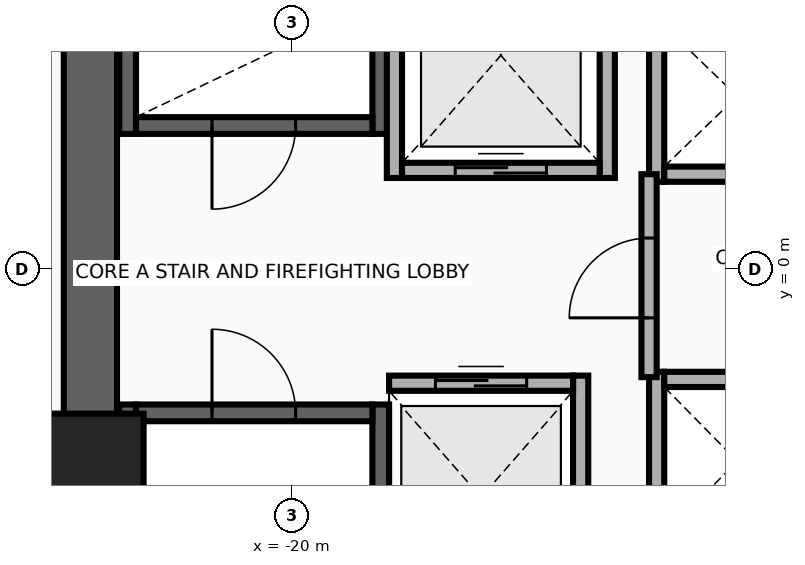
"""IFC4 building model, lengths in metres.
Left out: names, types, materials, properties, quantities, classifications, styles, units other than length and angle.
Written with IfcOpenShell. Run it as: python <this file> out.ifc"""

import sys

from ifc_helpers import new_model, si_unit, direction, frame, frame_2d, origin, origin_2d, place, context, subcontext, project, spatial, rectangle, extrude, source, transform, mapped, element, fill, save


model = new_model("IFC4")
c1 = context("Model", 3, precision=1e-05, world=origin(), true_north=direction((0.0, 1.0)))
c2 = subcontext(c1, "Body", "Model", "MODEL_VIEW")
j1 = project(units=[si_unit("LENGTHUNIT", "METRE"), si_unit("PLANEANGLEUNIT", "RADIAN")], contexts=[c1])
p1 = place(None, origin())
s1 = spatial("IfcSite", under=j1, at=p1, CompositionType="ELEMENT")
p2 = place(p1, origin())
s2 = spatial("IfcBuilding", under=s1, at=p2, CompositionType="ELEMENT")
p3 = place(p2, frame((0.0, 0.0, 48.2)))
s3 = spatial("IfcBuildingStorey", under=s2, at=p3, CompositionType="ELEMENT", Elevation=48.2)
for number, where, z_axis, x_axis in (
    (1, (-22.16, 1.78, 0.0), (0.0, 0.0, 1.0), (0.0, 1.0, 0.0)),
    (2, (-18.83, 1.78, 0.0), (0.0, 0.0, 1.0), (0.0, 1.0, 0.0)),
):
    element("IfcWall", number, at=place(p3, frame(where, z_axis=z_axis, x_axis=x_axis)), inside=s3, PredefinedType="SHEAR", context=c2, shape_type="SweptSolid", body=[
        extrude(rectangle(XDim=8.67, YDim=0.22, at=frame_2d((4.335, 0.0))), origin(), (0.0, 0.0, 1.0), 3.46),
    ])
p4 = place(p3, frame((-22.05, 1.89, 0.0), z_axis=(0.0, 0.0, 1.0), x_axis=(1.0, 0.0, 0.0)))
e3 = element("IfcWall", 3, at=p4, inside=s3, PredefinedType="SHEAR", context=c2, shape_type="SweptSolid", body=[
    extrude(rectangle(XDim=3.11, YDim=0.22, at=frame_2d((1.555, 0.0))), origin(), (0.0, 0.0, 1.0), 3.46),
])
p5 = place(p4, frame((1.0, 0.0, 0.0)))
e4 = element("IfcOpeningElement", 4, at=p5, cuts=e3, PredefinedType="OPENING", context=c2, shape_type="SweptSolid", body=[
    extrude(rectangle(XDim=1.1, YDim=2.15, at=frame_2d((0.55, 1.075))), frame((0.0, 0.125, 0.0), z_axis=(0.0, -1.0, 0.0), x_axis=(1.0, 0.0, 0.0)), (0.0, 0.0, 1.0), 0.25),
])
for number, where, z_axis, x_axis in (
    (5, (-22.16, -10.45, 0.0), (0.0, 0.0, 1.0), (0.0, 1.0, 0.0)),
    (6, (-18.83, -10.45, 0.0), (0.0, 0.0, 1.0), (0.0, 1.0, 0.0)),
):
    element("IfcWall", number, at=place(p3, frame(where, z_axis=z_axis, x_axis=x_axis)), inside=s3, PredefinedType="SHEAR", context=c2, shape_type="SweptSolid", body=[
        extrude(rectangle(XDim=8.67, YDim=0.22, at=frame_2d((4.335, 0.0))), origin(), (0.0, 0.0, 1.0), 3.46),
    ])
p6 = place(p3, frame((-22.05, -1.89, 0.0), z_axis=(0.0, 0.0, 1.0), x_axis=(1.0, 0.0, 0.0)))
e7 = element("IfcWall", 7, at=p6, inside=s3, PredefinedType="SHEAR", context=c2, shape_type="SweptSolid", body=[
    extrude(rectangle(XDim=3.11, YDim=0.22, at=frame_2d((1.555, 0.0))), origin(), (0.0, 0.0, 1.0), 3.46),
])
p7 = place(p6, frame((1.0, 0.0, 0.0)))
e8 = element("IfcOpeningElement", 8, at=p7, cuts=e7, PredefinedType="OPENING", context=c2, shape_type="SweptSolid", body=[
    extrude(rectangle(XDim=1.1, YDim=2.15, at=frame_2d((0.55, 1.075))), frame((0.0, 0.125, 0.0), z_axis=(0.0, -1.0, 0.0), x_axis=(1.0, 0.0, 0.0)), (0.0, 0.0, 1.0), 0.25),
])
p8 = place(p3, frame((-22.65, -11.15, 0.0), z_axis=(0.0, 0.0, 1.0), x_axis=(0.0, 1.0, 0.0)))
e9 = element("IfcWall", 9, at=p8, inside=s3, PredefinedType="SHEAR", context=c2, shape_type="SweptSolid", body=[
    extrude(rectangle(XDim=22.3, YDim=0.7, at=frame_2d((11.15, 0.0))), origin(), (0.0, 0.0, 1.0), 3.46),
])
m1 = source(origin(), c2, "Body", "SweptSolid", [
    extrude(rectangle(XDim=1.4, YDim=1.4, at=origin_2d()), origin(), (0.0, 0.0, 1.0), 3.7),
])
p9 = place(p3, frame((-22.65, -2.6, 0.0), z_axis=(0.0, 0.0, 1.0), x_axis=(1.0, 0.0, 0.0)))
e10 = element("IfcColumn", 10, at=p9, inside=s3, PredefinedType="COLUMN", context=c2, shape_type="MappedRepresentation", body=[
    mapped(m1, transform((0.0, 0.0, 0.0), x_axis=(1.0, 0.0, 0.0), y_axis=(0.0, 1.0, 0.0), z_axis=(0.0, 0.0, 1.0), scale=1.0)),
])
for number, where, z_axis, x_axis in (
    (11, (-18.65, 1.2, 0.0), (0.0, 0.0, 1.0), (0.0, 1.0, 0.0)),
    (12, (-15.85, 1.2, 0.0), (0.0, 0.0, 1.0), (0.0, 1.0, 0.0)),
):
    element("IfcWall", number, at=place(p3, frame(where, z_axis=z_axis, x_axis=x_axis)), inside=s3, PredefinedType="MOVABLE", context=c2, shape_type="SweptSolid", body=[
        extrude(rectangle(XDim=3.225, YDim=0.2, at=frame_2d((1.613, 0.0))), origin(), (0.0, 0.0, 1.0), 3.46),
    ])
p10 = place(p3, frame((-18.55, 1.3, 0.0), z_axis=(0.0, 0.0, 1.0), x_axis=(1.0, 0.0, 0.0)))
e13 = element("IfcWall", 13, at=p10, inside=s3, PredefinedType="MOVABLE", context=c2, shape_type="SweptSolid", body=[
    extrude(rectangle(XDim=2.6, YDim=0.2, at=frame_2d((1.3, 0.0))), origin(), (0.0, 0.0, 1.0), 3.46),
])
p11 = place(p10, frame((0.7, 0.0, 0.0)))
e14 = element("IfcOpeningElement", 14, at=p11, cuts=e13, PredefinedType="OPENING", context=c2, shape_type="SweptSolid", body=[
    extrude(rectangle(XDim=1.2, YDim=2.1, at=frame_2d((0.6, 1.05))), frame((0.0, 0.115, 0.0), z_axis=(0.0, -1.0, 0.0), x_axis=(1.0, 0.0, 0.0)), (0.0, 0.0, 1.0), 0.23),
])
p12 = place(p3, frame((-16.2, -4.6, 0.0), z_axis=(0.0, 0.0, 1.0), x_axis=(0.0, 1.0, 0.0)))
e15 = element("IfcWall", 15, at=p12, inside=s3, PredefinedType="MOVABLE", context=c2, shape_type="SweptSolid", body=[
    extrude(rectangle(XDim=3.2, YDim=0.2, at=frame_2d((1.6, 0.0))), origin(), (0.0, 0.0, 1.0), 3.46),
])
p13 = place(p3, frame((-18.72, -1.5, 0.0), z_axis=(0.0, 0.0, 1.0), x_axis=(1.0, 0.0, 0.0)))
e16 = element("IfcWall", 16, at=p13, inside=s3, PredefinedType="MOVABLE", context=c2, shape_type="SweptSolid", body=[
    extrude(rectangle(XDim=2.42, YDim=0.2, at=frame_2d((1.21, 0.0))), origin(), (0.0, 0.0, 1.0), 3.46),
])
p14 = place(p13, frame((0.61, 0.0, 0.0)))
e17 = element("IfcOpeningElement", 17, at=p14, cuts=e16, PredefinedType="OPENING", context=c2, shape_type="SweptSolid", body=[
    extrude(rectangle(XDim=1.2, YDim=2.1, at=frame_2d((0.6, 1.05))), frame((0.0, 0.115, 0.0), z_axis=(0.0, -1.0, 0.0), x_axis=(1.0, 0.0, 0.0)), (0.0, 0.0, 1.0), 0.23),
])
p15 = place(p3, frame((-15.2, 1.15, 0.0), z_axis=(0.0, 0.0, 1.0), x_axis=(0.0, 1.0, 0.0)))
e18 = element("IfcWall", 18, at=p15, inside=s3, PredefinedType="MOVABLE", context=c2, shape_type="SweptSolid", body=[
    extrude(rectangle(XDim=2.25, YDim=0.2, at=frame_2d((1.125, 0.0))), origin(), (0.0, 0.0, 1.0), 3.46),
])
p16 = place(p3, frame((-15.1, 1.25, 0.0), z_axis=(0.0, 0.0, 1.0), x_axis=(1.0, 0.0, 0.0)))
e19 = element("IfcWall", 19, at=p16, inside=s3, PredefinedType="MOVABLE", context=c2, shape_type="SweptSolid", body=[
    extrude(rectangle(XDim=1.92, YDim=0.2, at=frame_2d((0.96, 0.0))), origin(), (0.0, 0.0, 1.0), 3.46),
])
p17 = place(p3, frame((-15.2, -3.7, 0.0), z_axis=(0.0, 0.0, 1.0), x_axis=(0.0, 1.0, 0.0)))
e20 = element("IfcWall", 20, at=p17, inside=s3, PredefinedType="MOVABLE", context=c2, shape_type="SweptSolid", body=[
    extrude(rectangle(XDim=2.35, YDim=0.2, at=frame_2d((1.175, 0.0))), origin(), (0.0, 0.0, 1.0), 3.46),
])
p18 = place(p3, frame((-15.1, -1.45, 0.0), z_axis=(0.0, 0.0, 1.0), x_axis=(1.0, 0.0, 0.0)))
e21 = element("IfcWall", 21, at=p18, inside=s3, PredefinedType="MOVABLE", context=c2, shape_type="SweptSolid", body=[
    extrude(rectangle(XDim=1.92, YDim=0.2, at=frame_2d((0.96, 0.0))), origin(), (0.0, 0.0, 1.0), 3.46),
])
p19 = place(p3, frame((-15.3, -1.42, 0.0), z_axis=(0.0, 0.0, 1.0), x_axis=(0.0, 1.0, 0.0)))
e22 = element("IfcWall", 22, at=p19, inside=s3, PredefinedType="PARTITIONING", context=c2, shape_type="SweptSolid", body=[
    extrude(rectangle(XDim=2.67, YDim=0.2, at=frame_2d((1.335, 0.0))), origin(), (0.0, 0.0, 1.0), 3.46),
])
p20 = place(p19, frame((0.78, 0.0, 0.0)))
e23 = element("IfcOpeningElement", 23, at=p20, cuts=e22, PredefinedType="OPENING", context=c2, shape_type="SweptSolid", body=[
    extrude(rectangle(XDim=1.05, YDim=2.15, at=frame_2d((0.525, 1.075))), frame((0.0, 0.115, 0.0), z_axis=(0.0, -1.0, 0.0), x_axis=(1.0, 0.0, 0.0)), (0.0, 0.0, 1.0), 0.23),
])
p21 = place(p11, origin())
e24 = element("IfcDoor", 24, at=p21, inside=s3, OperationType="DOUBLE_DOOR_SLIDING", PredefinedType="DOOR", context=c2, shape_type="SweptSolid", body=[
    extrude(rectangle(XDim=1.2, YDim=2.1, at=frame_2d((0.6, 1.05))), frame((0.0, 0.025, 0.0), z_axis=(0.0, -1.0, 0.0), x_axis=(1.0, 0.0, 0.0)), (0.0, 0.0, 1.0), 0.05),
])
fill(e14, e24)
p22 = place(p14, origin())
e25 = element("IfcDoor", 25, at=p22, inside=s3, OperationType="DOUBLE_DOOR_SLIDING", PredefinedType="DOOR", context=c2, shape_type="SweptSolid", body=[
    extrude(rectangle(XDim=1.2, YDim=2.1, at=frame_2d((0.6, 1.05))), frame((0.0, 0.025, 0.0), z_axis=(0.0, -1.0, 0.0), x_axis=(1.0, 0.0, 0.0)), (0.0, 0.0, 1.0), 0.05),
])
fill(e17, e25)
p23 = place(p20, origin())
e26 = element("IfcDoor", 26, at=p23, inside=s3, OperationType="SINGLE_SWING_RIGHT", PredefinedType="DOOR", context=c2, shape_type="SweptSolid", body=[
    extrude(rectangle(XDim=1.05, YDim=2.15, at=frame_2d((0.525, 1.075))), frame((0.0, 0.025, 0.0), z_axis=(0.0, -1.0, 0.0), x_axis=(1.0, 0.0, 0.0)), (0.0, 0.0, 1.0), 0.05),
])
fill(e23, e26)
p24 = place(p5, frame((1.1, 0.0, 0.0), z_axis=(0.0, 0.0, 1.0), x_axis=(-1.0, 0.0, 0.0)))
e27 = element("IfcDoor", 27, at=p24, inside=s3, OperationType="SINGLE_SWING_LEFT", PredefinedType="DOOR", context=c2, shape_type="SweptSolid", body=[
    extrude(rectangle(XDim=1.1, YDim=2.15, at=frame_2d((0.55, 1.075))), frame((0.0, 0.025, 0.0), z_axis=(0.0, -1.0, 0.0), x_axis=(1.0, 0.0, 0.0)), (0.0, 0.0, 1.0), 0.05),
])
fill(e4, e27)
p25 = place(p7, origin())
e28 = element("IfcDoor", 28, at=p25, inside=s3, OperationType="SINGLE_SWING_RIGHT", PredefinedType="DOOR", context=c2, shape_type="SweptSolid", body=[
    extrude(rectangle(XDim=1.1, YDim=2.15, at=frame_2d((0.55, 1.075))), frame((0.0, 0.025, 0.0), z_axis=(0.0, -1.0, 0.0), x_axis=(1.0, 0.0, 0.0)), (0.0, 0.0, 1.0), 0.05),
])
fill(e8, e28)
save(model, sys.argv[1])
